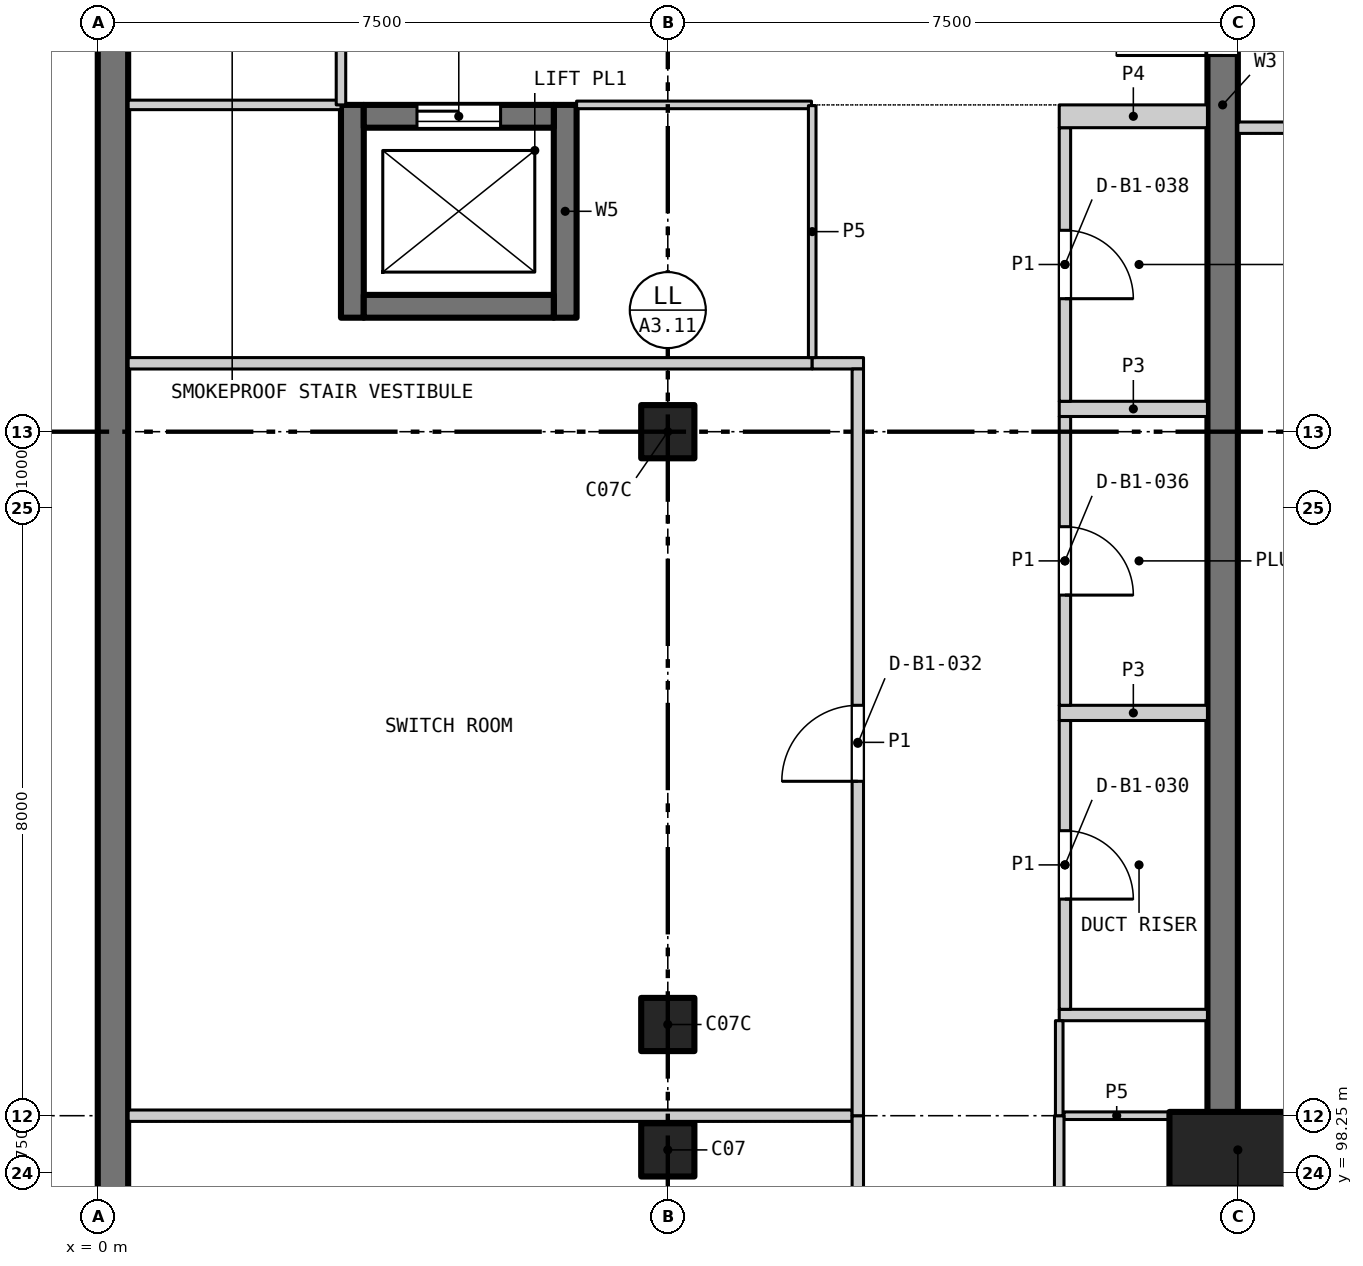
"""IFC4 building model, lengths in metres.
Left out: names, types, materials, properties, quantities, classifications, styles, units other than length and angle.
Written with IfcOpenShell. Run it as: python <this file> out.ifc"""

import sys

from ifc_helpers import new_model, si_unit, direction, frame, frame_2d, origin, origin_2d, place, context, subcontext, project, spatial, rectangle, extrude, element, fill, save


model = new_model("IFC4")
c1 = context("Model", 3, precision=1e-05, world=origin(), true_north=direction((0.0, 1.0)))
c2 = subcontext(c1, "Body", "Model", "MODEL_VIEW")
j1 = project(units=[si_unit("LENGTHUNIT", "METRE"), si_unit("PLANEANGLEUNIT", "RADIAN")], contexts=[c1])
p1 = place(None, origin())
s1 = spatial("IfcSite", under=j1, at=p1, CompositionType="ELEMENT")
p2 = place(p1, origin())
s2 = spatial("IfcBuilding", under=s1, at=p2, CompositionType="ELEMENT")
p3 = place(p2, frame((0.0, 0.0, -10.0)))
s3 = spatial("IfcBuildingStorey", under=s2, at=p3, CompositionType="ELEMENT", Elevation=-10.0)
for number, where, z_axis, x_axis in (
    (1, (7.5, 98.55, -1.4), (0.0, 0.0, 1.0), (1.0, 0.0, 0.0)),
    (2, (7.5, 100.2, -1.4), (0.0, 0.0, 1.0), (1.0, 0.0, 0.0)),
    (3, (7.5, 108.0, -1.4), (0.0, 0.0, 1.0), (1.0, 0.0, 0.0)),
):
    element("IfcColumn", number, at=place(p3, frame(where, z_axis=z_axis, x_axis=x_axis)), inside=s3, PredefinedType="COLUMN", context=c2, shape_type="SweptSolid", body=[
        extrude(rectangle(XDim=0.7, YDim=0.7, at=origin_2d()), origin(), (0.0, 0.0, 1.0), 6.4),
    ])
p4 = place(p3, frame((0.2, 18.0, -1.4), z_axis=(0.0, 0.0, 1.0), x_axis=(0.0, 1.0, 0.0)))
e4 = element("IfcWall", 4, at=p4, inside=s3, PredefinedType="SOLIDWALL", context=c2, shape_type="SweptSolid", body=[
    extrude(rectangle(XDim=108.0, YDim=0.4, at=frame_2d((54.0, 0.0))), origin(), (0.0, 0.0, 1.0), 6.4),
])
p5 = place(p3, frame((14.8, 99.0, -1.4), z_axis=(0.0, 0.0, 1.0), x_axis=(0.0, 1.0, 0.0)))
e5 = element("IfcWall", 5, at=p5, inside=s3, PredefinedType="SHEAR", context=c2, shape_type="SweptSolid", body=[
    extrude(rectangle(XDim=26.6, YDim=0.4, at=frame_2d((13.3, 0.0))), origin(), (0.0, 0.0, 1.0), 6.4),
])
p6 = place(p5, frame((13.95, 0.0, 1.4)))
e6 = element("IfcOpeningElement", 6, at=p6, cuts=e5, PredefinedType="OPENING", context=c2, shape_type="SweptSolid", body=[
    extrude(rectangle(XDim=1.4, YDim=2.4, at=frame_2d((0.7, 1.2))), frame((0.0, 0.21, 0.0), z_axis=(0.0, -1.0, 0.0), x_axis=(1.0, 0.0, 0.0)), (0.0, 0.0, 1.0), 0.42),
])
for number, where, z_axis, x_axis in (
    (7, (3.35, 109.5, -1.4), (0.0, 0.0, 1.0), (0.0, 1.0, 0.0)),
    (8, (6.15, 109.5, -1.4), (0.0, 0.0, 1.0), (0.0, 1.0, 0.0)),
):
    element("IfcWall", number, at=place(p3, frame(where, z_axis=z_axis, x_axis=x_axis)), inside=s3, PredefinedType="SHEAR", context=c2, shape_type="SweptSolid", body=[
        extrude(rectangle(XDim=2.8, YDim=0.3, at=frame_2d((1.4, 0.0))), origin(), (0.0, 0.0, 1.0), 6.4),
    ])
p7 = place(p3, frame((3.5, 109.65, -1.4), z_axis=(0.0, 0.0, 1.0), x_axis=(1.0, 0.0, 0.0)))
e9 = element("IfcWall", 9, at=p7, inside=s3, PredefinedType="SHEAR", context=c2, shape_type="SweptSolid", body=[
    extrude(rectangle(XDim=2.5, YDim=0.3, at=frame_2d((1.25, 0.0))), origin(), (0.0, 0.0, 1.0), 6.4),
])
p8 = place(p3, frame((3.5, 112.15, -1.4), z_axis=(0.0, 0.0, 1.0), x_axis=(1.0, 0.0, 0.0)))
e10 = element("IfcWall", 10, at=p8, inside=s3, PredefinedType="SHEAR", context=c2, shape_type="SweptSolid", body=[
    extrude(rectangle(XDim=2.5, YDim=0.3, at=frame_2d((1.25, 0.0))), origin(), (0.0, 0.0, 1.0), 6.4),
])
p9 = place(p8, frame((0.7, 0.0, 1.4)))
e11 = element("IfcOpeningElement", 11, at=p9, cuts=e10, PredefinedType="OPENING", context=c2, shape_type="SweptSolid", body=[
    extrude(rectangle(XDim=1.1, YDim=2.1, at=frame_2d((0.55, 1.05))), frame((0.0, 0.16, 0.0), z_axis=(0.0, -1.0, 0.0), x_axis=(1.0, 0.0, 0.0)), (0.0, 0.0, 1.0), 0.32),
])
p10 = place(p3, frame((15.0, 98.55, -1.4), z_axis=(0.0, 0.0, 1.0), x_axis=(1.0, 0.0, 0.0)))
e12 = element("IfcColumn", 12, at=p10, inside=s3, PredefinedType="COLUMN", context=c2, shape_type="SweptSolid", body=[
    extrude(rectangle(XDim=1.8, YDim=1.0, at=origin_2d()), origin(), (0.0, 0.0, 1.0), 6.4),
])
p11 = place(p3, frame((12.65, 100.325, 0.0), z_axis=(0.0, 0.0, 1.0), x_axis=(1.0, 0.0, 0.0)))
e13 = element("IfcWall", 13, at=p11, inside=s3, PredefinedType="PARTITIONING", context=c2, shape_type="SweptSolid", body=[
    extrude(rectangle(XDim=1.95, YDim=0.15, at=frame_2d((0.975, 0.0))), origin(), (0.0, 0.0, 1.0), 4.75),
])
p12 = place(p3, frame((12.725, 100.4, 0.0), z_axis=(0.0, 0.0, 1.0), x_axis=(0.0, 1.0, 0.0)))
e14 = element("IfcWall", 14, at=p12, inside=s3, PredefinedType="PARTITIONING", context=c2, shape_type="SweptSolid", body=[
    extrude(rectangle(XDim=3.8, YDim=0.15, at=frame_2d((1.9, 0.0))), origin(), (0.0, 0.0, 1.0), 4.75),
])
p13 = place(p12, frame((1.45, 0.0, 0.0)))
e15 = element("IfcOpeningElement", 15, at=p13, cuts=e14, PredefinedType="OPENING", context=c2, shape_type="SweptSolid", body=[
    extrude(rectangle(XDim=0.9, YDim=2.1, at=frame_2d((0.45, 1.05))), frame((0.0, 0.085, 0.0), z_axis=(0.0, -1.0, 0.0), x_axis=(1.0, 0.0, 0.0)), (0.0, 0.0, 1.0), 0.17),
])
p14 = place(p3, frame((12.65, 104.3, 0.0), z_axis=(0.0, 0.0, 1.0), x_axis=(1.0, 0.0, 0.0)))
e16 = element("IfcWall", 16, at=p14, inside=s3, PredefinedType="PARTITIONING", context=c2, shape_type="SweptSolid", body=[
    extrude(rectangle(XDim=1.95, YDim=0.2, at=frame_2d((0.975, 0.0))), origin(), (0.0, 0.0, 1.0), 4.75),
])
p15 = place(p3, frame((12.725, 104.4, 0.0), z_axis=(0.0, 0.0, 1.0), x_axis=(0.0, 1.0, 0.0)))
e17 = element("IfcWall", 17, at=p15, inside=s3, PredefinedType="PARTITIONING", context=c2, shape_type="SweptSolid", body=[
    extrude(rectangle(XDim=3.8, YDim=0.15, at=frame_2d((1.9, 0.0))), origin(), (0.0, 0.0, 1.0), 4.75),
])
p16 = place(p15, frame((1.45, 0.0, 0.0)))
e18 = element("IfcOpeningElement", 18, at=p16, cuts=e17, PredefinedType="OPENING", context=c2, shape_type="SweptSolid", body=[
    extrude(rectangle(XDim=0.9, YDim=2.1, at=frame_2d((0.45, 1.05))), frame((0.0, 0.085, 0.0), z_axis=(0.0, -1.0, 0.0), x_axis=(1.0, 0.0, 0.0)), (0.0, 0.0, 1.0), 0.17),
])
p17 = place(p3, frame((12.65, 108.3, 0.0), z_axis=(0.0, 0.0, 1.0), x_axis=(1.0, 0.0, 0.0)))
e19 = element("IfcWall", 19, at=p17, inside=s3, PredefinedType="PARTITIONING", context=c2, shape_type="SweptSolid", body=[
    extrude(rectangle(XDim=1.95, YDim=0.2, at=frame_2d((0.975, 0.0))), origin(), (0.0, 0.0, 1.0), 4.75),
])
p18 = place(p3, frame((12.725, 108.4, 0.0), z_axis=(0.0, 0.0, 1.0), x_axis=(0.0, 1.0, 0.0)))
e20 = element("IfcWall", 20, at=p18, inside=s3, PredefinedType="PARTITIONING", context=c2, shape_type="SweptSolid", body=[
    extrude(rectangle(XDim=3.6, YDim=0.15, at=frame_2d((1.8, 0.0))), origin(), (0.0, 0.0, 1.0), 4.75),
])
p19 = place(p18, frame((1.35, 0.0, 0.0)))
e21 = element("IfcOpeningElement", 21, at=p19, cuts=e20, PredefinedType="OPENING", context=c2, shape_type="SweptSolid", body=[
    extrude(rectangle(XDim=0.9, YDim=2.1, at=frame_2d((0.45, 1.05))), frame((0.0, 0.085, 0.0), z_axis=(0.0, -1.0, 0.0), x_axis=(1.0, 0.0, 0.0)), (0.0, 0.0, 1.0), 0.17),
])
p20 = place(p3, frame((12.65, 112.15, 0.0), z_axis=(0.0, 0.0, 1.0), x_axis=(1.0, 0.0, 0.0)))
e22 = element("IfcWall", 22, at=p20, inside=s3, PredefinedType="PARTITIONING", context=c2, shape_type="SweptSolid", body=[
    extrude(rectangle(XDim=1.95, YDim=0.3, at=frame_2d((0.975, 0.0))), origin(), (0.0, 0.0, 1.0), 4.75),
])
p21 = place(p3, frame((0.4, 99.0, 0.0), z_axis=(0.0, 0.0, 1.0), x_axis=(1.0, 0.0, 0.0)))
e23 = element("IfcWall", 23, at=p21, inside=s3, PredefinedType="PARTITIONING", context=c2, shape_type="SweptSolid", body=[
    extrude(rectangle(XDim=9.525, YDim=0.15, at=frame_2d((4.763, 0.0))), origin(), (0.0, 0.0, 1.0), 4.75),
])
p22 = place(p3, frame((12.712, 99.0, 0.0), z_axis=(0.0, 0.0, 1.0), x_axis=(1.0, 0.0, 0.0)))
e24 = element("IfcWall", 24, at=p22, inside=s3, PredefinedType="PARTITIONING", context=c2, shape_type="SweptSolid", body=[
    extrude(rectangle(XDim=1.388, YDim=0.1, at=frame_2d((0.694, 0.0))), origin(), (0.0, 0.0, 1.0), 4.75),
])
p23 = place(p3, frame((0.4, 108.9, 0.0), z_axis=(0.0, 0.0, 1.0), x_axis=(1.0, 0.0, 0.0)))
e25 = element("IfcWall", 25, at=p23, inside=s3, PredefinedType="PARTITIONING", context=c2, shape_type="SweptSolid", body=[
    extrude(rectangle(XDim=9.0, YDim=0.15, at=frame_2d((4.5, 0.0))), origin(), (0.0, 0.0, 1.0), 4.75),
])
p24 = place(p3, frame((9.4, 108.9, 0.0), z_axis=(0.0, 0.0, 1.0), x_axis=(1.0, 0.0, 0.0)))
e26 = element("IfcWall", 26, at=p24, inside=s3, PredefinedType="PARTITIONING", context=c2, shape_type="SweptSolid", body=[
    extrude(rectangle(XDim=0.675, YDim=0.15, at=frame_2d((0.337, 0.0))), origin(), (0.0, 0.0, 1.0), 4.75),
])
p25 = place(p3, frame((15.0, 112.0, 0.0), z_axis=(0.0, 0.0, 1.0), x_axis=(1.0, 0.0, 0.0)))
e27 = element("IfcWall", 27, at=p25, inside=s3, PredefinedType="PARTITIONING", context=c2, shape_type="SweptSolid", body=[
    extrude(rectangle(XDim=14.99, YDim=0.15, at=frame_2d((7.495, 0.0))), origin(), (0.0, 0.0, 1.0), 4.75),
])
p26 = place(p3, frame((0.4, 112.3, 0.0), z_axis=(0.0, 0.0, 1.0), x_axis=(1.0, 0.0, 0.0)))
e28 = element("IfcWall", 28, at=p26, inside=s3, PredefinedType="PARTITIONING", context=c2, shape_type="SweptSolid", body=[
    extrude(rectangle(XDim=2.8, YDim=0.125, at=frame_2d((1.4, 0.0))), origin(), (0.0, 0.0, 1.0), 4.75),
])
p27 = place(p3, frame((6.3, 112.3, 0.0), z_axis=(0.0, 0.0, 1.0), x_axis=(1.0, 0.0, 0.0)))
e29 = element("IfcWall", 29, at=p27, inside=s3, PredefinedType="PARTITIONING", context=c2, shape_type="SweptSolid", body=[
    extrude(rectangle(XDim=3.09, YDim=0.1, at=frame_2d((1.545, 0.0))), origin(), (0.0, 0.0, 1.0), 4.75),
])
p28 = place(p3, frame((3.2, 112.3, 0.0), z_axis=(0.0, 0.0, 1.0), x_axis=(0.0, 1.0, 0.0)))
e30 = element("IfcWall", 30, at=p28, inside=s3, PredefinedType="PARTITIONING", context=c2, shape_type="SweptSolid", body=[
    extrude(rectangle(XDim=5.75, YDim=0.125, at=frame_2d((2.875, 0.0))), origin(), (0.0, 0.0, 1.0), 4.75),
])
p29 = place(p28, frame((2.35, 0.0, 0.0)))
e31 = element("IfcOpeningElement", 31, at=p29, cuts=e30, PredefinedType="OPENING", context=c2, shape_type="SweptSolid", body=[
    extrude(rectangle(XDim=1.1, YDim=2.1, at=frame_2d((0.55, 1.05))), frame((0.0, 0.073, 0.0), z_axis=(0.0, -1.0, 0.0), x_axis=(1.0, 0.0, 0.0)), (0.0, 0.0, 1.0), 0.145),
])
p30 = place(p3, frame((9.4, 108.975, 0.0), z_axis=(0.0, 0.0, 1.0), x_axis=(0.0, 1.0, 0.0)))
e32 = element("IfcWall", 32, at=p30, inside=s3, PredefinedType="PARTITIONING", context=c2, shape_type="SweptSolid", body=[
    extrude(rectangle(XDim=3.315, YDim=0.1, at=frame_2d((1.657, 0.0))), origin(), (0.0, 0.0, 1.0), 4.75),
])
p31 = place(p3, frame((10.0, 87.75, 0.0), z_axis=(0.0, 0.0, 1.0), x_axis=(0.0, 1.0, 0.0)))
e33 = element("IfcWall", 33, at=p31, inside=s3, PredefinedType="PARTITIONING", context=c2, shape_type="SweptSolid", body=[
    extrude(rectangle(XDim=11.25, YDim=0.15, at=frame_2d((5.625, 0.0))), origin(), (0.0, 0.0, 1.0), 4.75),
])
p32 = place(p31, frame((5.05, 0.0, 0.0)))
e34 = element("IfcOpeningElement", 34, at=p32, cuts=e33, PredefinedType="OPENING", context=c2, shape_type="SweptSolid", body=[
    extrude(rectangle(XDim=1.2, YDim=2.4, at=frame_2d((0.6, 1.2))), frame((0.0, 0.085, 0.0), z_axis=(0.0, -1.0, 0.0), x_axis=(1.0, 0.0, 0.0)), (0.0, 0.0, 1.0), 0.17),
])
p33 = place(p3, frame((10.0, 99.0, 0.0), z_axis=(0.0, 0.0, 1.0), x_axis=(0.0, 1.0, 0.0)))
e35 = element("IfcWall", 35, at=p33, inside=s3, PredefinedType="PARTITIONING", context=c2, shape_type="SweptSolid", body=[
    extrude(rectangle(XDim=9.825, YDim=0.15, at=frame_2d((4.913, 0.0))), origin(), (0.0, 0.0, 1.0), 4.75),
])
p34 = place(p33, frame((4.4, 0.0, 0.0)))
e36 = element("IfcOpeningElement", 36, at=p34, cuts=e35, PredefinedType="OPENING", context=c2, shape_type="SweptSolid", body=[
    extrude(rectangle(XDim=1.0, YDim=2.1, at=frame_2d((0.5, 1.05))), frame((0.0, 0.085, 0.0), z_axis=(0.0, -1.0, 0.0), x_axis=(1.0, 0.0, 0.0)), (0.0, 0.0, 1.0), 0.17),
])
p35 = place(p3, frame((12.65, 85.5, 0.0), z_axis=(0.0, 0.0, 1.0), x_axis=(0.0, 1.0, 0.0)))
e37 = element("IfcWall", 37, at=p35, inside=s3, PredefinedType="PARTITIONING", context=c2, shape_type="SweptSolid", body=[
    extrude(rectangle(XDim=13.5, YDim=0.125, at=frame_2d((6.75, 0.0))), origin(), (0.0, 0.0, 1.0), 4.75),
])
p36 = place(p3, frame((12.65, 99.0, 0.0), z_axis=(0.0, 0.0, 1.0), x_axis=(0.0, 1.0, 0.0)))
e38 = element("IfcWall", 38, at=p36, inside=s3, PredefinedType="PARTITIONING", context=c2, shape_type="SweptSolid", body=[
    extrude(rectangle(XDim=1.25, YDim=0.1, at=frame_2d((0.625, 0.0))), origin(), (0.0, 0.0, 1.0), 4.75),
])
p37 = place(p13, frame((0.9, 0.0, 0.0), z_axis=(0.0, 0.0, 1.0), x_axis=(-1.0, 0.0, 0.0)))
e39 = element("IfcDoor", 39, at=p37, inside=s3, OperationType="SINGLE_SWING_RIGHT", PredefinedType="DOOR", context=c2, shape_type="SweptSolid", body=[
    extrude(rectangle(XDim=0.9, YDim=2.1, at=frame_2d((0.45, 1.05))), frame((0.0, 0.025, 0.0), z_axis=(0.0, -1.0, 0.0), x_axis=(1.0, 0.0, 0.0)), (0.0, 0.0, 1.0), 0.05),
])
fill(e15, e39)
p38 = place(p34, origin())
e40 = element("IfcDoor", 40, at=p38, inside=s3, OperationType="SINGLE_SWING_LEFT", PredefinedType="DOOR", context=c2, shape_type="SweptSolid", body=[
    extrude(rectangle(XDim=1.0, YDim=2.1, at=frame_2d((0.5, 1.05))), frame((0.0, 0.025, 0.0), z_axis=(0.0, -1.0, 0.0), x_axis=(1.0, 0.0, 0.0)), (0.0, 0.0, 1.0), 0.05),
])
fill(e36, e40)
p39 = place(p16, frame((0.9, 0.0, 0.0), z_axis=(0.0, 0.0, 1.0), x_axis=(-1.0, 0.0, 0.0)))
e41 = element("IfcDoor", 41, at=p39, inside=s3, OperationType="SINGLE_SWING_RIGHT", PredefinedType="DOOR", context=c2, shape_type="SweptSolid", body=[
    extrude(rectangle(XDim=0.9, YDim=2.1, at=frame_2d((0.45, 1.05))), frame((0.0, 0.025, 0.0), z_axis=(0.0, -1.0, 0.0), x_axis=(1.0, 0.0, 0.0)), (0.0, 0.0, 1.0), 0.05),
])
fill(e18, e41)
p40 = place(p19, frame((0.9, 0.0, 0.0), z_axis=(0.0, 0.0, 1.0), x_axis=(-1.0, 0.0, 0.0)))
e42 = element("IfcDoor", 42, at=p40, inside=s3, OperationType="SINGLE_SWING_RIGHT", PredefinedType="DOOR", context=c2, shape_type="SweptSolid", body=[
    extrude(rectangle(XDim=0.9, YDim=2.1, at=frame_2d((0.45, 1.05))), frame((0.0, 0.025, 0.0), z_axis=(0.0, -1.0, 0.0), x_axis=(1.0, 0.0, 0.0)), (0.0, 0.0, 1.0), 0.05),
])
fill(e21, e42)
p41 = place(p6, origin())
e43 = element("IfcDoor", 43, at=p41, inside=s3, OperationType="SINGLE_SWING_LEFT", PredefinedType="DOOR", context=c2, shape_type="SweptSolid", body=[
    extrude(rectangle(XDim=1.4, YDim=2.4, at=frame_2d((0.7, 1.2))), frame((0.0, 0.025, 0.0), z_axis=(0.0, -1.0, 0.0), x_axis=(1.0, 0.0, 0.0)), (0.0, 0.0, 1.0), 0.05),
])
fill(e6, e43)
p42 = place(p9, origin())
e44 = element("IfcDoor", 44, at=p42, inside=s3, OperationType="SLIDING_TO_LEFT", PredefinedType="DOOR", context=c2, shape_type="SweptSolid", body=[
    extrude(rectangle(XDim=1.1, YDim=2.1, at=frame_2d((0.55, 1.05))), frame((0.0, 0.025, 0.0), z_axis=(0.0, -1.0, 0.0), x_axis=(1.0, 0.0, 0.0)), (0.0, 0.0, 1.0), 0.05),
])
fill(e11, e44)
save(model, sys.argv[1])
